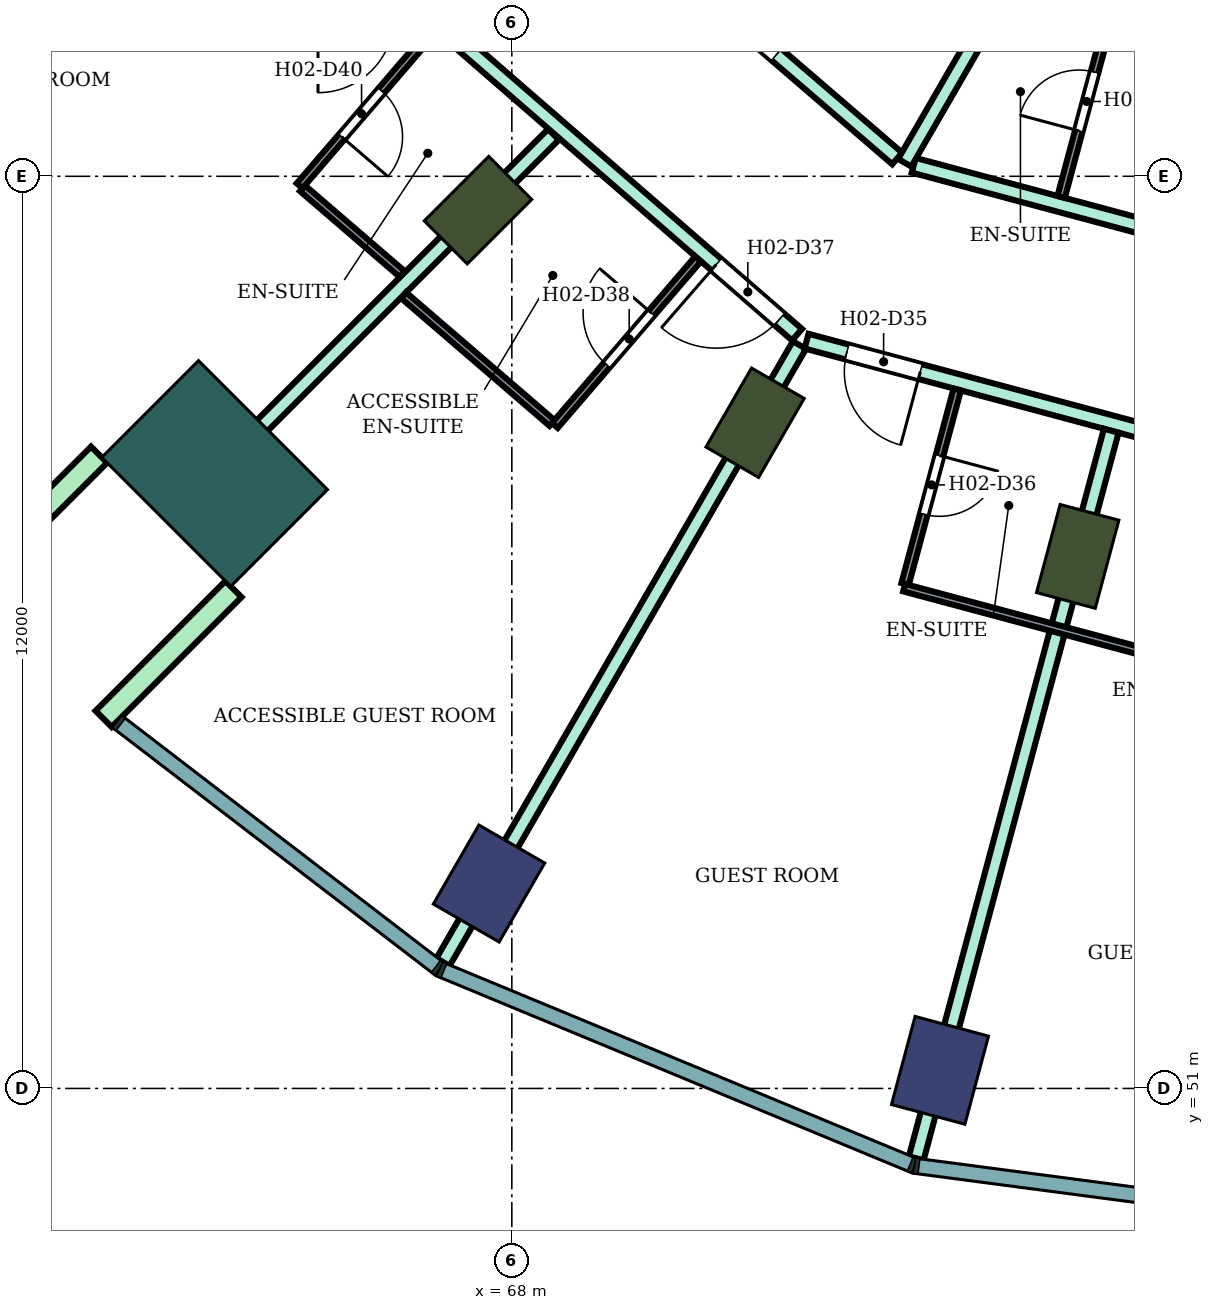
"""IFC4 building model, lengths in metres.
Left out: names, types, materials, properties, quantities, classifications, styles, units other than length and angle.
Written with IfcOpenShell. Run it as: python <this file> out.ifc"""

import sys

from ifc_helpers import new_model, si_unit, direction, frame, frame_2d, origin, origin_2d, place, context, subcontext, project, spatial, rectangle, extrude, element, fill, save


model = new_model("IFC4")
c1 = context("Model", 3, precision=1e-05, world=origin(), true_north=direction((0.0, 1.0)))
c2 = subcontext(c1, "Body", "Model", "MODEL_VIEW")
j1 = project(units=[si_unit("LENGTHUNIT", "METRE"), si_unit("PLANEANGLEUNIT", "RADIAN")], contexts=[c1])
p1 = place(None, origin())
s1 = spatial("IfcSite", under=j1, at=p1, CompositionType="ELEMENT")
p2 = place(p1, origin())
s2 = spatial("IfcBuilding", under=s1, at=p2, CompositionType="ELEMENT")
p3 = place(p2, frame((0.0, 0.0, 47.8)))
s3 = spatial("IfcBuildingStorey", under=s2, at=p3, CompositionType="ELEMENT", Elevation=47.8)
for number, where, z_axis, x_axis in (
    (1, (67.7, 53.696, 0.0), (0.0, 0.0, 1.0), (-0.5, -0.866, 0.0)),
    (2, (73.633, 51.238, 0.0), (0.0, 0.0, 1.0), (-0.259, -0.966, 0.0)),
):
    element("IfcColumn", number, at=place(p3, frame(where, z_axis=z_axis, x_axis=x_axis)), inside=s3, PredefinedType="COLUMN", context=c2, shape_type="SweptSolid", body=[
        extrude(rectangle(XDim=1.2, YDim=1.0, at=origin_2d()), origin(), (0.0, 0.0, 1.0), 3.8),
    ])
for number, where, z_axis, x_axis in (
    (3, (67.555, 62.555, 0.0), (0.0, 0.0, 1.0), (-0.707, -0.707, 0.0)),
    (4, (71.2, 59.758, 0.0), (0.0, 0.0, 1.0), (-0.5, -0.866, 0.0)),
    (5, (75.445, 58.0, 0.0), (0.0, 0.0, 1.0), (-0.259, -0.966, 0.0)),
):
    element("IfcColumn", number, at=place(p3, frame(where, z_axis=z_axis, x_axis=x_axis)), inside=s3, PredefinedType="COLUMN", context=c2, shape_type="SweptSolid", body=[
        extrude(rectangle(XDim=1.2, YDim=0.8, at=origin_2d()), origin(), (0.0, 0.0, 1.0), 3.8),
    ])
p4 = place(p3, frame((64.09, 59.09, 0.0), z_axis=(0.0, 0.0, 1.0), x_axis=(-0.707106781187, -0.707106781187, 0.0)))
e6 = element("IfcColumn", 6, at=p4, inside=s3, PredefinedType="COLUMN", context=c2, shape_type="SweptSolid", body=[
    extrude(rectangle(XDim=1.8, YDim=2.4, at=origin_2d()), origin(), (0.0, 0.0, 1.0), 3.8),
])
for number, where, z_axis, x_axis in (
    (7, (62.57, 59.338, 0.0), (0.0, 0.0, 1.0), (-0.707, -0.707, 0.0)),
    (8, (64.338, 57.57, 0.0), (0.0, 0.0, 1.0), (-0.707, -0.707, 0.0)),
):
    element("IfcWall", number, at=place(p3, frame(where, z_axis=z_axis, x_axis=x_axis)), inside=s3, PredefinedType="NOTDEFINED", context=c2, shape_type="SweptSolid", body=[
        extrude(rectangle(XDim=2.416, YDim=0.3, at=frame_2d((1.208, 0.0))), origin(), (0.0, 0.0, 1.0), 3.8),
    ])
p5 = place(p3, frame((63.594, 58.598, 0.0), z_axis=(0.0, 0.0, 1.0), x_axis=(0.707228748718, 0.706984792613, 0.0)))
e9 = element("IfcWall", 9, at=p5, inside=s3, PredefinedType="PARTITIONING", context=c2, shape_type="SweptSolid", body=[
    extrude(rectangle(XDim=7.005, YDim=0.2, at=frame_2d((3.503, 0.0))), origin(), (0.0, 0.0, 1.0), 3.35),
])
p6 = place(p3, frame((67.082, 64.972, 0.0), z_axis=(0.0, 0.0, 1.0), x_axis=(0.755033632617, -0.655686063309, 0.0)))
e10 = element("IfcWall", 10, at=p6, inside=s3, PredefinedType="PARTITIONING", context=c2, shape_type="SweptSolid", body=[
    extrude(rectangle(XDim=6.185, YDim=0.2, at=frame_2d((3.093, 0.0))), origin(), (0.0, 0.0, 1.0), 3.35),
])
p7 = place(p6, frame((4.778, 0.0, 0.0)))
e11 = element("IfcOpeningElement", 11, at=p7, cuts=e10, PredefinedType="OPENING", context=c2, shape_type="SweptSolid", body=[
    extrude(rectangle(XDim=1.1, YDim=2.1, at=frame_2d((0.55, 1.05))), frame((0.0, 0.11, 0.0), z_axis=(0.0, -1.0, 0.0), x_axis=(1.0, 0.0, 0.0)), (0.0, 0.0, 1.0), 0.22),
])
p8 = place(p3, frame((67.094, 52.663, 0.0), z_axis=(0.0, 0.0, 1.0), x_axis=(0.500216854217, 0.865900166738, 0.0)))
e12 = element("IfcWall", 12, at=p8, inside=s3, PredefinedType="PARTITIONING", context=c2, shape_type="SweptSolid", body=[
    extrude(rectangle(XDim=9.375, YDim=0.2, at=frame_2d((4.688, 0.0))), origin(), (0.0, 0.0, 1.0), 3.35),
])
p9 = place(p3, frame((69.158, 66.6, 0.0), z_axis=(0.0, 0.0, 1.0), x_axis=(0.758063092745, -0.652181222835, 0.0)))
e13 = element("IfcWall", 13, at=p9, inside=s3, PredefinedType="PARTITIONING", context=c2, shape_type="SweptSolid", body=[
    extrude(rectangle(XDim=5.16, YDim=0.2, at=frame_2d((2.58, 0.0))), origin(), (0.0, 0.0, 1.0), 3.35),
])
p10 = place(p9, frame((2.165, 0.0, 0.0)))
e14 = element("IfcOpeningElement", 14, at=p10, cuts=e13, PredefinedType="OPENING", context=c2, shape_type="SweptSolid", body=[
    extrude(rectangle(XDim=0.9, YDim=2.1, at=frame_2d((0.45, 1.05))), frame((0.0, 0.11, 0.0), z_axis=(0.0, -1.0, 0.0), x_axis=(1.0, 0.0, 0.0)), (0.0, 0.0, 1.0), 0.22),
])
p11 = place(p3, frame((71.877, 60.832, 0.0), z_axis=(0.0, 0.0, 1.0), x_axis=(0.965852509869, -0.259092510851, 0.0)))
e15 = element("IfcWall", 15, at=p11, inside=s3, PredefinedType="PARTITIONING", context=c2, shape_type="SweptSolid", body=[
    extrude(rectangle(XDim=8.32, YDim=0.2, at=frame_2d((4.16, 0.0))), origin(), (0.0, 0.0, 1.0), 3.35),
])
p12 = place(p11, frame((6.86, 0.0, 0.0)))
e16 = element("IfcOpeningElement", 16, at=p12, cuts=e15, PredefinedType="OPENING", context=c2, shape_type="SweptSolid", body=[
    extrude(rectangle(XDim=1.0, YDim=2.1, at=frame_2d((0.5, 1.05))), frame((0.0, 0.11, 0.0), z_axis=(0.0, -1.0, 0.0), x_axis=(1.0, 0.0, 0.0)), (0.0, 0.0, 1.0), 0.22),
])
p13 = place(p11, frame((0.55, 0.0, 0.0)))
e17 = element("IfcOpeningElement", 17, at=p13, cuts=e15, PredefinedType="OPENING", context=c2, shape_type="SweptSolid", body=[
    extrude(rectangle(XDim=1.0, YDim=2.1, at=frame_2d((0.5, 1.05))), frame((0.0, 0.11, 0.0), z_axis=(0.0, -1.0, 0.0), x_axis=(1.0, 0.0, 0.0)), (0.0, 0.0, 1.0), 0.22),
])
p14 = place(p3, frame((73.287, 63.145, 0.0), z_axis=(0.0, 0.0, 1.0), x_axis=(0.965854200194, -0.259086209526, 0.0)))
e18 = element("IfcWall", 18, at=p14, inside=s3, PredefinedType="PARTITIONING", context=c2, shape_type="SweptSolid", body=[
    extrude(rectangle(XDim=6.82, YDim=0.2, at=frame_2d((3.41, 0.0))), origin(), (0.0, 0.0, 1.0), 3.35),
])
p15 = place(p14, frame((5.4, 0.0, 0.0)))
e19 = element("IfcOpeningElement", 19, at=p15, cuts=e18, PredefinedType="OPENING", context=c2, shape_type="SweptSolid", body=[
    extrude(rectangle(XDim=1.0, YDim=2.1, at=frame_2d((0.5, 1.05))), frame((0.0, 0.11, 0.0), z_axis=(0.0, -1.0, 0.0), x_axis=(1.0, 0.0, 0.0)), (0.0, 0.0, 1.0), 0.22),
])
p16 = place(p3, frame((73.169, 63.178, 0.0), z_axis=(0.0, 0.0, 1.0), x_axis=(0.50020860964, 0.865904929448, 0.0)))
e20 = element("IfcWall", 20, at=p16, inside=s3, PredefinedType="PARTITIONING", context=c2, shape_type="SweptSolid", body=[
    extrude(rectangle(XDim=5.955, YDim=0.2, at=frame_2d((2.978, 0.0))), origin(), (0.0, 0.0, 1.0), 3.35),
])
p17 = place(p3, frame((73.321, 50.081, 0.0), z_axis=(0.0, 0.0, 1.0), x_axis=(0.25891218439, 0.965900864879, 0.0)))
e21 = element("IfcWall", 21, at=p17, inside=s3, PredefinedType="PARTITIONING", context=c2, shape_type="SweptSolid", body=[
    extrude(rectangle(XDim=9.909, YDim=0.2, at=frame_2d((4.955, 0.0))), origin(), (0.0, 0.0, 1.0), 3.35),
])
p18 = place(p3, frame((65.246, 62.842, 0.0), z_axis=(0.0, 0.0, 1.0), x_axis=(0.758030338995, -0.652219292234, 0.0)))
e22 = element("IfcWall", 22, at=p18, inside=s3, PredefinedType="PARTITIONING", context=c2, shape_type="SweptSolid", body=[
    extrude(rectangle(XDim=1.73, YDim=0.1, at=frame_2d((0.865, 0.0))), origin(), (0.0, 0.0, 1.0), 3.35),
])
p19 = place(p3, frame((65.208, 62.875, 0.0), z_axis=(0.0, 0.0, 1.0), x_axis=(0.65205430601, 0.758172264076, 0.0)))
e23 = element("IfcWall", 23, at=p19, inside=s3, PredefinedType="PARTITIONING", context=c2, shape_type="SweptSolid", body=[
    extrude(rectangle(XDim=2.8, YDim=0.1, at=frame_2d((1.4, 0.0))), origin(), (0.0, 0.0, 1.0), 3.35),
])
p20 = place(p19, frame((0.85, 0.0, 0.0)))
e24 = element("IfcOpeningElement", 24, at=p20, cuts=e23, PredefinedType="OPENING", context=c2, shape_type="SweptSolid", body=[
    extrude(rectangle(XDim=0.8, YDim=2.1, at=frame_2d((0.4, 1.05))), frame((0.0, 0.06, 0.0), z_axis=(0.0, -1.0, 0.0), x_axis=(1.0, 0.0, 0.0)), (0.0, 0.0, 1.0), 0.12),
])
p21 = place(p3, frame((66.576, 61.435, 0.0), z_axis=(0.0, 0.0, 1.0), x_axis=(0.757970550281, -0.652288774169, 0.0)))
e25 = element("IfcWall", 25, at=p21, inside=s3, PredefinedType="PARTITIONING", context=c2, shape_type="SweptSolid", body=[
    extrude(rectangle(XDim=2.576, YDim=0.1, at=frame_2d((1.288, 0.0))), origin(), (0.0, 0.0, 1.0), 3.35),
])
p22 = place(p3, frame((68.566, 59.722, 0.0), z_axis=(0.0, 0.0, 1.0), x_axis=(0.65193146671, 0.758277892803, 0.0)))
e26 = element("IfcWall", 26, at=p22, inside=s3, PredefinedType="PARTITIONING", context=c2, shape_type="SweptSolid", body=[
    extrude(rectangle(XDim=2.89, YDim=0.1, at=frame_2d((1.445, 0.0))), origin(), (0.0, 0.0, 1.0), 3.35),
])
p23 = place(p22, frame((1.05, 0.0, 0.0)))
e27 = element("IfcOpeningElement", 27, at=p23, cuts=e26, PredefinedType="OPENING", context=c2, shape_type="SweptSolid", body=[
    extrude(rectangle(XDim=0.9, YDim=2.1, at=frame_2d((0.45, 1.05))), frame((0.0, 0.06, 0.0), z_axis=(0.0, -1.0, 0.0), x_axis=(1.0, 0.0, 0.0)), (0.0, 0.0, 1.0), 0.12),
])
p24 = place(p3, frame((73.174, 57.636, 0.0), z_axis=(0.0, 0.0, 1.0), x_axis=(0.258952498977, 0.96589005755, 0.0)))
e28 = element("IfcWall", 28, at=p24, inside=s3, PredefinedType="PARTITIONING", context=c2, shape_type="SweptSolid", body=[
    extrude(rectangle(XDim=2.65, YDim=0.1, at=frame_2d((1.325, 0.0))), origin(), (0.0, 0.0, 1.0), 3.35),
])
p25 = place(p24, frame((0.95, 0.0, 0.0)))
e29 = element("IfcOpeningElement", 29, at=p25, cuts=e28, PredefinedType="OPENING", context=c2, shape_type="SweptSolid", body=[
    extrude(rectangle(XDim=0.8, YDim=2.1, at=frame_2d((0.4, 1.05))), frame((0.0, 0.06, 0.0), z_axis=(0.0, -1.0, 0.0), x_axis=(1.0, 0.0, 0.0)), (0.0, 0.0, 1.0), 0.12),
])
p26 = place(p3, frame((73.161, 57.588, 0.0), z_axis=(0.0, 0.0, 1.0), x_axis=(0.965858994467, -0.259068336173, 0.0)))
e30 = element("IfcWall", 30, at=p26, inside=s3, PredefinedType="PARTITIONING", context=c2, shape_type="SweptSolid", body=[
    extrude(rectangle(XDim=4.15, YDim=0.1, at=frame_2d((2.075, 0.0))), origin(), (0.0, 0.0, 1.0), 3.35),
])
p27 = place(p3, frame((75.227, 62.729, 0.0), z_axis=(0.0, 0.0, 1.0), x_axis=(0.258945475746, 0.965891940432, 0.0)))
e31 = element("IfcWall", 31, at=p27, inside=s3, PredefinedType="PARTITIONING", context=c2, shape_type="SweptSolid", body=[
    extrude(rectangle(XDim=2.7, YDim=0.1, at=frame_2d((1.35, 0.0))), origin(), (0.0, 0.0, 1.0), 3.35),
])
p28 = place(p27, frame((0.9, 0.0, 0.0)))
e32 = element("IfcOpeningElement", 32, at=p28, cuts=e31, PredefinedType="OPENING", context=c2, shape_type="SweptSolid", body=[
    extrude(rectangle(XDim=0.8, YDim=2.1, at=frame_2d((0.4, 1.05))), frame((0.0, 0.06, 0.0), z_axis=(0.0, -1.0, 0.0), x_axis=(1.0, 0.0, 0.0)), (0.0, 0.0, 1.0), 0.12),
])
p29 = place(p13, frame((1.0, 0.0, 0.0), z_axis=(0.0, 0.0, 1.0), x_axis=(-1.0, 0.0, 0.0)))
e33 = element("IfcDoor", 33, at=p29, inside=s3, OperationType="SINGLE_SWING_LEFT", PredefinedType="DOOR", context=c2, shape_type="SweptSolid", body=[
    extrude(rectangle(XDim=1.0, YDim=2.1, at=frame_2d((0.5, 1.05))), frame((0.0, 0.025, 0.0), z_axis=(0.0, -1.0, 0.0), x_axis=(1.0, 0.0, 0.0)), (0.0, 0.0, 1.0), 0.05),
])
fill(e17, e33)
p30 = place(p25, frame((0.8, 0.0, 0.0), z_axis=(0.0, 0.0, 1.0), x_axis=(-1.0, 0.0, 0.0)))
e34 = element("IfcDoor", 34, at=p30, inside=s3, OperationType="SINGLE_SWING_LEFT", PredefinedType="DOOR", context=c2, shape_type="SweptSolid", body=[
    extrude(rectangle(XDim=0.8, YDim=2.1, at=frame_2d((0.4, 1.05))), frame((0.0, 0.025, 0.0), z_axis=(0.0, -1.0, 0.0), x_axis=(1.0, 0.0, 0.0)), (0.0, 0.0, 1.0), 0.05),
])
fill(e29, e34)
p31 = place(p7, frame((1.1, 0.0, 0.0), z_axis=(0.0, 0.0, 1.0), x_axis=(-1.0, 0.0, 0.0)))
e35 = element("IfcDoor", 35, at=p31, inside=s3, OperationType="SINGLE_SWING_RIGHT", PredefinedType="DOOR", context=c2, shape_type="SweptSolid", body=[
    extrude(rectangle(XDim=1.1, YDim=2.1, at=frame_2d((0.55, 1.05))), frame((0.0, 0.025, 0.0), z_axis=(0.0, -1.0, 0.0), x_axis=(1.0, 0.0, 0.0)), (0.0, 0.0, 1.0), 0.05),
])
fill(e11, e35)
p32 = place(p23, origin())
e36 = element("IfcDoor", 36, at=p32, inside=s3, OperationType="SINGLE_SWING_RIGHT", PredefinedType="DOOR", context=c2, shape_type="SweptSolid", body=[
    extrude(rectangle(XDim=0.9, YDim=2.1, at=frame_2d((0.45, 1.05))), frame((0.0, 0.025, 0.0), z_axis=(0.0, -1.0, 0.0), x_axis=(1.0, 0.0, 0.0)), (0.0, 0.0, 1.0), 0.05),
])
fill(e27, e36)
p33 = place(p20, frame((0.8, 0.0, 0.0), z_axis=(0.0, 0.0, 1.0), x_axis=(-1.0, 0.0, 0.0)))
e37 = element("IfcDoor", 37, at=p33, inside=s3, OperationType="SINGLE_SWING_RIGHT", PredefinedType="DOOR", context=c2, shape_type="SweptSolid", body=[
    extrude(rectangle(XDim=0.8, YDim=2.1, at=frame_2d((0.4, 1.05))), frame((0.0, 0.025, 0.0), z_axis=(0.0, -1.0, 0.0), x_axis=(1.0, 0.0, 0.0)), (0.0, 0.0, 1.0), 0.05),
])
fill(e24, e37)
p34 = place(p28, origin())
e38 = element("IfcDoor", 38, at=p34, inside=s3, OperationType="SINGLE_SWING_LEFT", PredefinedType="DOOR", context=c2, shape_type="SweptSolid", body=[
    extrude(rectangle(XDim=0.8, YDim=2.1, at=frame_2d((0.4, 1.05))), frame((0.0, 0.025, 0.0), z_axis=(0.0, -1.0, 0.0), x_axis=(1.0, 0.0, 0.0)), (0.0, 0.0, 1.0), 0.05),
])
fill(e32, e38)
p35 = place(p10, origin())
e39 = element("IfcDoor", 39, at=p35, inside=s3, OperationType="SINGLE_SWING_LEFT", PredefinedType="DOOR", context=c2, shape_type="SweptSolid", body=[
    extrude(rectangle(XDim=0.9, YDim=2.1, at=frame_2d((0.45, 1.05))), frame((0.0, 0.025, 0.0), z_axis=(0.0, -1.0, 0.0), x_axis=(1.0, 0.0, 0.0)), (0.0, 0.0, 1.0), 0.05),
])
fill(e14, e39)
save(model, sys.argv[1])
